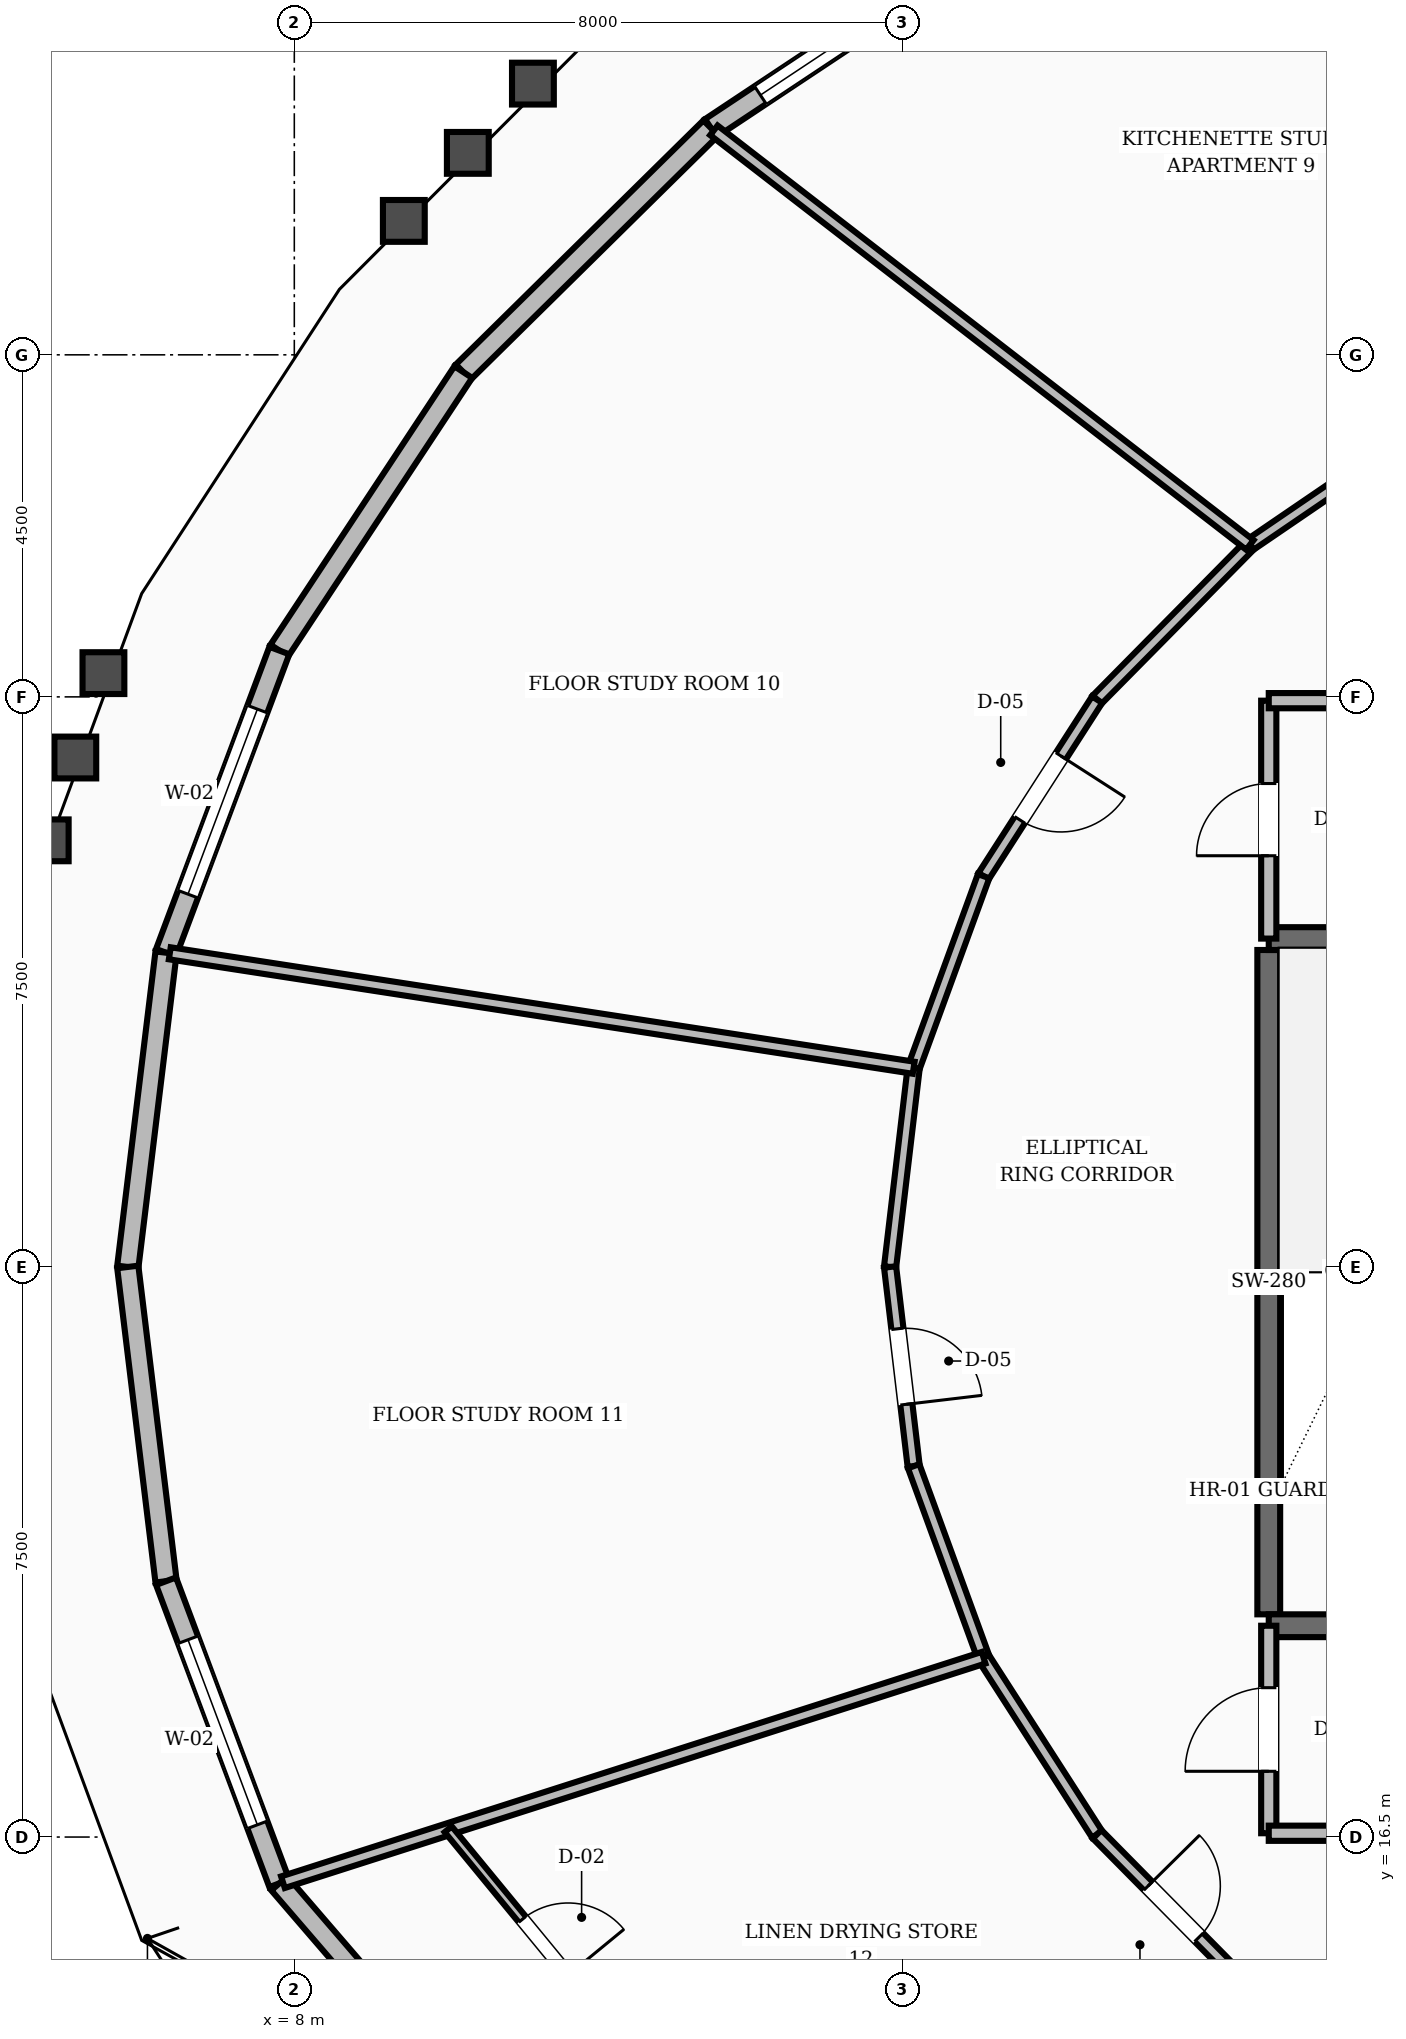
"""IFC4 building model, lengths in metres.
Left out: names, types, materials, properties, quantities, classifications, styles, units other than length and angle.
Written with IfcOpenShell. Run it as: python <this file> out.ifc"""

import sys

from ifc_helpers import new_model, si_unit, direction, frame, frame_2d, origin, place, context, subcontext, project, spatial, rectangle, extrude, element, fill, save


model = new_model("IFC4")
c1 = context("Model", 3, precision=1e-05, world=origin(), true_north=direction((0.0, 1.0)))
c2 = subcontext(c1, "Body", "Model", "MODEL_VIEW")
j1 = project(units=[si_unit("LENGTHUNIT", "METRE"), si_unit("PLANEANGLEUNIT", "RADIAN")], contexts=[c1])
p1 = place(None, origin())
s1 = spatial("IfcSite", under=j1, at=p1, CompositionType="ELEMENT")
p2 = place(p1, origin())
s2 = spatial("IfcBuilding", under=s1, at=p2, CompositionType="ELEMENT")
p3 = place(p2, frame((0.0, 0.0, 44.8)))
s3 = spatial("IfcBuildingStorey", under=s2, at=p3, CompositionType="ELEMENT", Elevation=44.8)
p4 = place(p3, frame((20.82, 19.43, 0.0), z_axis=(0.0, 0.0, 1.0), x_axis=(0.0, 1.0, 0.0)))
e1 = element("IfcWall", 1, at=p4, inside=s3, PredefinedType="SHEAR", context=c2, shape_type="SweptSolid", body=[
    extrude(rectangle(XDim=8.74, YDim=0.3, at=frame_2d((4.37, 0.0))), origin(), (0.0, 0.0, 1.0), 3.6),
])
p5 = place(p3, frame((20.82, 19.28, 0.0), z_axis=(0.0, 0.0, 1.0), x_axis=(1.0, 0.0, 0.0)))
e2 = element("IfcWall", 2, at=p5, inside=s3, PredefinedType="SHEAR", context=c2, shape_type="SweptSolid", body=[
    extrude(rectangle(XDim=3.6, YDim=0.3, at=frame_2d((1.8, 0.0))), origin(), (0.0, 0.0, 1.0), 3.6),
])
p6 = place(p5, frame((1.3, 0.0, 0.0)))
e3 = element("IfcOpeningElement", 3, at=p6, cuts=e2, PredefinedType="OPENING", context=c2, shape_type="SweptSolid", body=[
    extrude(rectangle(XDim=1.1, YDim=2.1, at=frame_2d((0.55, 1.05))), frame((0.0, 0.16, 0.0), z_axis=(0.0, -1.0, 0.0), x_axis=(1.0, 0.0, 0.0)), (0.0, 0.0, 1.0), 0.32),
])
p7 = place(p3, frame((20.82, 28.32, 0.0), z_axis=(0.0, 0.0, 1.0), x_axis=(1.0, 0.0, 0.0)))
e4 = element("IfcWall", 4, at=p7, inside=s3, PredefinedType="SHEAR", context=c2, shape_type="SweptSolid", body=[
    extrude(rectangle(XDim=3.6, YDim=0.3, at=frame_2d((1.8, 0.0))), origin(), (0.0, 0.0, 1.0), 3.6),
])
p8 = place(p3, frame((17.449, 41.619, 0.0), z_axis=(0.0, 0.0, 1.0), x_axis=(-0.833089497156, -0.55313821937, 0.0)))
e5 = element("IfcWall", 5, at=p8, inside=s3, PredefinedType="STANDARD", context=c2, shape_type="SweptSolid", body=[
    extrude(rectangle(XDim=4.764, YDim=0.28, at=frame_2d((2.382, 0.0))), origin(), (0.0, 0.0, 1.0), 2.65),
])
p9 = place(p8, frame((0.782, 0.0, 0.8)))
e6 = element("IfcOpeningElement", 6, at=p9, cuts=e5, PredefinedType="OPENING", context=c2, shape_type="SweptSolid", body=[
    extrude(rectangle(XDim=3.2, YDim=1.65, at=frame_2d((1.6, 0.825))), frame((0.0, 0.15, 0.0), z_axis=(0.0, -1.0, 0.0), x_axis=(1.0, 0.0, 0.0)), (0.0, 0.0, 1.0), 0.3),
])
p10 = place(p3, frame((13.48, 38.984, 0.0), z_axis=(0.0, 0.0, 1.0), x_axis=(-0.712106444973, -0.702071514184, 0.0)))
e7 = element("IfcWall", 7, at=p10, inside=s3, PredefinedType="STANDARD", context=c2, shape_type="SweptSolid", body=[
    extrude(rectangle(XDim=4.574, YDim=0.28, at=frame_2d((2.287, 0.0))), origin(), (0.0, 0.0, 1.0), 2.65),
])
p11 = place(p3, frame((10.223, 35.773, 0.0), z_axis=(0.0, 0.0, 1.0), x_axis=(-0.551192292831, -0.834378245356, 0.0)))
e8 = element("IfcWall", 8, at=p11, inside=s3, PredefinedType="STANDARD", context=c2, shape_type="SweptSolid", body=[
    extrude(rectangle(XDim=4.391, YDim=0.28, at=frame_2d((2.195, 0.0))), origin(), (0.0, 0.0, 1.0), 2.65),
])
p12 = place(p3, frame((7.803, 32.109, 0.0), z_axis=(0.0, 0.0, 1.0), x_axis=(-0.351066723894, -0.936350444745, 0.0)))
e9 = element("IfcWall", 9, at=p12, inside=s3, PredefinedType="STANDARD", context=c2, shape_type="SweptSolid", body=[
    extrude(rectangle(XDim=4.246, YDim=0.28, at=frame_2d((2.123, 0.0))), origin(), (0.0, 0.0, 1.0), 2.65),
])
p13 = place(p12, frame((0.823, 0.0, 0.8)))
e10 = element("IfcOpeningElement", 10, at=p13, cuts=e9, PredefinedType="OPENING", context=c2, shape_type="SweptSolid", body=[
    extrude(rectangle(XDim=2.6, YDim=1.65, at=frame_2d((1.3, 0.825))), frame((0.0, 0.15, 0.0), z_axis=(0.0, -1.0, 0.0), x_axis=(1.0, 0.0, 0.0)), (0.0, 0.0, 1.0), 0.3),
])
for number, where, z_axis, x_axis in (
    (11, (6.312, 28.134, 0.0), (0.0, 0.0, 1.0), (-0.121, -0.993, 0.0)),
    (12, (5.809, 24.0, 0.0), (0.0, 0.0, 1.0), (0.121, -0.993, 0.0)),
):
    element("IfcWall", number, at=place(p3, frame(where, z_axis=z_axis, x_axis=x_axis)), inside=s3, PredefinedType="STANDARD", context=c2, shape_type="SweptSolid", body=[
        extrude(rectangle(XDim=4.165, YDim=0.28, at=frame_2d((2.082, 0.0))), origin(), (0.0, 0.0, 1.0), 2.65),
    ])
p14 = place(p3, frame((6.312, 19.866, 0.0), z_axis=(0.0, 0.0, 1.0), x_axis=(0.351066723894, -0.936350444745, 0.0)))
e13 = element("IfcWall", 13, at=p14, inside=s3, PredefinedType="STANDARD", context=c2, shape_type="SweptSolid", body=[
    extrude(rectangle(XDim=4.246, YDim=0.28, at=frame_2d((2.123, 0.0))), origin(), (0.0, 0.0, 1.0), 2.65),
])
p15 = place(p14, frame((0.823, 0.0, 0.8)))
e14 = element("IfcOpeningElement", 14, at=p15, cuts=e13, PredefinedType="OPENING", context=c2, shape_type="SweptSolid", body=[
    extrude(rectangle(XDim=2.6, YDim=1.65, at=frame_2d((1.3, 0.825))), frame((0.0, 0.15, 0.0), z_axis=(0.0, -1.0, 0.0), x_axis=(1.0, 0.0, 0.0)), (0.0, 0.0, 1.0), 0.3),
])
p16 = place(p3, frame((7.803, 15.891, 0.0), z_axis=(0.0, 0.0, 1.0), x_axis=(0.652392900896, -0.757880929211, 0.0)))
e15 = element("IfcWall", 15, at=p16, inside=s3, PredefinedType="STANDARD", context=c2, shape_type="SweptSolid", body=[
    extrude(rectangle(XDim=4.515, YDim=0.28, at=frame_2d((2.258, 0.0))), origin(), (0.0, 0.0, 1.0), 2.65),
])
p17 = place(p3, frame((20.82, 16.55, 0.0), z_axis=(0.0, 0.0, 1.0), x_axis=(0.0, 1.0, 0.0)))
e16 = element("IfcWall", 16, at=p17, inside=s3, PredefinedType="SOLIDWALL", context=c2, shape_type="SweptSolid", body=[
    extrude(rectangle(XDim=2.73, YDim=0.2, at=frame_2d((1.365, 0.0))), origin(), (0.0, 0.0, 1.0), 2.61),
])
p18 = place(p17, frame((0.815, 0.0, 0.0)))
e17 = element("IfcOpeningElement", 17, at=p18, cuts=e16, PredefinedType="OPENING", context=c2, shape_type="SweptSolid", body=[
    extrude(rectangle(XDim=1.1, YDim=2.1, at=frame_2d((0.55, 1.05))), frame((0.0, 0.11, 0.0), z_axis=(0.0, -1.0, 0.0), x_axis=(1.0, 0.0, 0.0)), (0.0, 0.0, 1.0), 0.22),
])
p19 = place(p3, frame((20.82, 16.55, 0.0), z_axis=(0.0, 0.0, 1.0), x_axis=(1.0, 0.0, 0.0)))
e18 = element("IfcWall", 18, at=p19, inside=s3, PredefinedType="SOLIDWALL", context=c2, shape_type="SweptSolid", body=[
    extrude(rectangle(XDim=3.98, YDim=0.2, at=frame_2d((1.99, 0.0))), origin(), (0.0, 0.0, 1.0), 2.61),
])
p20 = place(p3, frame((20.82, 28.32, 0.0), z_axis=(0.0, 0.0, 1.0), x_axis=(0.0, 1.0, 0.0)))
e19 = element("IfcWall", 19, at=p20, inside=s3, PredefinedType="SOLIDWALL", context=c2, shape_type="SweptSolid", body=[
    extrude(rectangle(XDim=3.13, YDim=0.2, at=frame_2d((1.565, 0.0))), origin(), (0.0, 0.0, 1.0), 2.61),
])
p21 = place(p20, frame((1.09, 0.0, 0.0)))
e20 = element("IfcOpeningElement", 20, at=p21, cuts=e19, PredefinedType="OPENING", context=c2, shape_type="SweptSolid", body=[
    extrude(rectangle(XDim=0.95, YDim=2.1, at=frame_2d((0.475, 1.05))), frame((0.0, 0.11, 0.0), z_axis=(0.0, -1.0, 0.0), x_axis=(1.0, 0.0, 0.0)), (0.0, 0.0, 1.0), 0.22),
])
p22 = place(p3, frame((20.82, 31.45, 0.0), z_axis=(0.0, 0.0, 1.0), x_axis=(1.0, 0.0, 0.0)))
e21 = element("IfcWall", 21, at=p22, inside=s3, PredefinedType="SOLIDWALL", context=c2, shape_type="SweptSolid", body=[
    extrude(rectangle(XDim=3.98, YDim=0.2, at=frame_2d((1.99, 0.0))), origin(), (0.0, 0.0, 1.0), 2.61),
])
p23 = place(p3, frame((23.021, 35.17, 0.0), z_axis=(0.0, 0.0, 1.0), x_axis=(-0.826112340767, -0.563505457323, 0.0)))
e22 = element("IfcWall", 22, at=p23, inside=s3, PredefinedType="SOLIDWALL", context=c2, shape_type="SweptSolid", body=[
    extrude(rectangle(XDim=2.965, YDim=0.16, at=frame_2d((1.482, 0.0))), origin(), (0.0, 0.0, 1.0), 2.61),
])
p24 = place(p3, frame((20.572, 33.499, 0.0), z_axis=(0.0, 0.0, 1.0), x_axis=(-0.702569520063, -0.711615113301, 0.0)))
e23 = element("IfcWall", 23, at=p24, inside=s3, PredefinedType="SOLIDWALL", context=c2, shape_type="SweptSolid", body=[
    extrude(rectangle(XDim=2.861, YDim=0.16, at=frame_2d((1.43, 0.0))), origin(), (0.0, 0.0, 1.0), 2.61),
])
p25 = place(p3, frame((18.562, 31.463, 0.0), z_axis=(0.0, 0.0, 1.0), x_axis=(-0.540891657444, -0.841092274907, 0.0)))
e24 = element("IfcWall", 24, at=p25, inside=s3, PredefinedType="SOLIDWALL", context=c2, shape_type="SweptSolid", body=[
    extrude(rectangle(XDim=2.761, YDim=0.16, at=frame_2d((1.38, 0.0))), origin(), (0.0, 0.0, 1.0), 2.61),
])
p26 = place(p25, frame((0.881, 0.0, 0.0)))
e25 = element("IfcOpeningElement", 25, at=p26, cuts=e24, PredefinedType="OPENING", context=c2, shape_type="SweptSolid", body=[
    extrude(rectangle(XDim=1.0, YDim=2.1, at=frame_2d((0.5, 1.05))), frame((0.0, 0.09, 0.0), z_axis=(0.0, -1.0, 0.0), x_axis=(1.0, 0.0, 0.0)), (0.0, 0.0, 1.0), 0.18),
])
p27 = place(p3, frame((17.068, 29.141, 0.0), z_axis=(0.0, 0.0, 1.0), x_axis=(-0.342882618672, -0.939378257047, 0.0)))
e26 = element("IfcWall", 26, at=p27, inside=s3, PredefinedType="SOLIDWALL", context=c2, shape_type="SweptSolid", body=[
    extrude(rectangle(XDim=2.683, YDim=0.16, at=frame_2d((1.341, 0.0))), origin(), (0.0, 0.0, 1.0), 2.61),
])
p28 = place(p3, frame((16.148, 26.621, 0.0), z_axis=(0.0, 0.0, 1.0), x_axis=(-0.117667763342, -0.993053018459, 0.0)))
e27 = element("IfcWall", 27, at=p28, inside=s3, PredefinedType="SOLIDWALL", context=c2, shape_type="SweptSolid", body=[
    extrude(rectangle(XDim=2.639, YDim=0.16, at=frame_2d((1.32, 0.0))), origin(), (0.0, 0.0, 1.0), 2.61),
])
p29 = place(p3, frame((15.838, 24.0, 0.0), z_axis=(0.0, 0.0, 1.0), x_axis=(0.117667763342, -0.993053018459, 0.0)))
e28 = element("IfcWall", 28, at=p29, inside=s3, PredefinedType="SOLIDWALL", context=c2, shape_type="SweptSolid", body=[
    extrude(rectangle(XDim=2.639, YDim=0.16, at=frame_2d((1.32, 0.0))), origin(), (0.0, 0.0, 1.0), 2.61),
])
p30 = place(p29, frame((0.82, 0.0, 0.0)))
e29 = element("IfcOpeningElement", 29, at=p30, cuts=e28, PredefinedType="OPENING", context=c2, shape_type="SweptSolid", body=[
    extrude(rectangle(XDim=1.0, YDim=2.1, at=frame_2d((0.5, 1.05))), frame((0.0, 0.09, 0.0), z_axis=(0.0, -1.0, 0.0), x_axis=(1.0, 0.0, 0.0)), (0.0, 0.0, 1.0), 0.18),
])
p31 = place(p3, frame((16.148, 21.379, 0.0), z_axis=(0.0, 0.0, 1.0), x_axis=(0.342882618672, -0.939378257047, 0.0)))
e30 = element("IfcWall", 30, at=p31, inside=s3, PredefinedType="SOLIDWALL", context=c2, shape_type="SweptSolid", body=[
    extrude(rectangle(XDim=2.683, YDim=0.16, at=frame_2d((1.341, 0.0))), origin(), (0.0, 0.0, 1.0), 2.61),
])
p32 = place(p3, frame((17.068, 18.859, 0.0), z_axis=(0.0, 0.0, 1.0), x_axis=(0.540891657444, -0.841092274907, 0.0)))
e31 = element("IfcWall", 31, at=p32, inside=s3, PredefinedType="SOLIDWALL", context=c2, shape_type="SweptSolid", body=[
    extrude(rectangle(XDim=2.761, YDim=0.16, at=frame_2d((1.38, 0.0))), origin(), (0.0, 0.0, 1.0), 2.61),
])
p33 = place(p3, frame((18.562, 16.537, 0.0), z_axis=(0.0, 0.0, 1.0), x_axis=(0.702569520063, -0.711615113301, 0.0)))
e32 = element("IfcWall", 32, at=p33, inside=s3, PredefinedType="SOLIDWALL", context=c2, shape_type="SweptSolid", body=[
    extrude(rectangle(XDim=2.861, YDim=0.16, at=frame_2d((1.43, 0.0))), origin(), (0.0, 0.0, 1.0), 2.61),
])
p34 = place(p33, frame((0.955, 0.0, 0.0)))
e33 = element("IfcOpeningElement", 33, at=p34, cuts=e32, PredefinedType="OPENING", context=c2, shape_type="SweptSolid", body=[
    extrude(rectangle(XDim=0.95, YDim=2.1, at=frame_2d((0.475, 1.05))), frame((0.0, 0.09, 0.0), z_axis=(0.0, -1.0, 0.0), x_axis=(1.0, 0.0, 0.0)), (0.0, 0.0, 1.0), 0.18),
])
p35 = place(p3, frame((20.572, 33.499, 0.0), z_axis=(0.0, 0.0, 1.0), x_axis=(-0.790999441118, 0.611816871417, 0.0)))
e34 = element("IfcWall", 34, at=p35, inside=s3, PredefinedType="SOLIDWALL", context=c2, shape_type="SweptSolid", body=[
    extrude(rectangle(XDim=8.915, YDim=0.16, at=frame_2d((4.458, 0.0))), origin(), (0.0, 0.0, 1.0), 2.61),
])
p36 = place(p3, frame((16.148, 26.621, 0.0), z_axis=(0.0, 0.0, 1.0), x_axis=(-0.988371982693, 0.152055331469, 0.0)))
e35 = element("IfcWall", 35, at=p36, inside=s3, PredefinedType="SOLIDWALL", context=c2, shape_type="SweptSolid", body=[
    extrude(rectangle(XDim=9.902, YDim=0.16, at=frame_2d((4.951, 0.0))), origin(), (0.0, 0.0, 1.0), 2.61),
])
p37 = place(p3, frame((17.068, 18.859, 0.0), z_axis=(0.0, 0.0, 1.0), x_axis=(-0.952328332438, -0.30507498625, 0.0)))
e36 = element("IfcWall", 36, at=p37, inside=s3, PredefinedType="SOLIDWALL", context=c2, shape_type="SweptSolid", body=[
    extrude(rectangle(XDim=9.679, YDim=0.16, at=frame_2d((4.84, 0.0))), origin(), (0.0, 0.0, 1.0), 2.61),
])
p38 = place(p3, frame((10.025, 16.602, 0.0), z_axis=(0.0, 0.0, 1.0), x_axis=(0.634900022164, -0.772594306125, 0.0)))
e37 = element("IfcWall", 37, at=p38, inside=s3, PredefinedType="PARTITIONING", context=c2, shape_type="SweptSolid", body=[
    extrude(rectangle(XDim=4.02, YDim=0.12, at=frame_2d((2.01, 0.0))), origin(), (0.0, 0.0, 1.0), 2.61),
])
p39 = place(p38, frame((1.535, 0.0, 0.0)))
e38 = element("IfcOpeningElement", 38, at=p39, cuts=e37, PredefinedType="OPENING", context=c2, shape_type="SweptSolid", body=[
    extrude(rectangle(XDim=0.95, YDim=2.1, at=frame_2d((0.475, 1.05))), frame((0.0, 0.07, 0.0), z_axis=(0.0, -1.0, 0.0), x_axis=(1.0, 0.0, 0.0)), (0.0, 0.0, 1.0), 0.14),
])
p40 = place(p9, origin())
e39 = element("IfcWindow", 39, at=p40, inside=s3, PartitioningType="SINGLE_PANEL", PredefinedType="WINDOW", context=c2, shape_type="SweptSolid", body=[
    extrude(rectangle(XDim=3.2, YDim=1.65, at=frame_2d((1.6, 0.825))), frame((0.0, 0.03, 0.0), z_axis=(0.0, -1.0, 0.0), x_axis=(1.0, 0.0, 0.0)), (0.0, 0.0, 1.0), 0.06),
])
fill(e6, e39)
p41 = place(p13, origin())
e40 = element("IfcWindow", 40, at=p41, inside=s3, PartitioningType="SINGLE_PANEL", PredefinedType="WINDOW", context=c2, shape_type="SweptSolid", body=[
    extrude(rectangle(XDim=2.6, YDim=1.65, at=frame_2d((1.3, 0.825))), frame((0.0, 0.03, 0.0), z_axis=(0.0, -1.0, 0.0), x_axis=(1.0, 0.0, 0.0)), (0.0, 0.0, 1.0), 0.06),
])
fill(e10, e40)
p42 = place(p15, origin())
e41 = element("IfcWindow", 41, at=p42, inside=s3, PartitioningType="SINGLE_PANEL", PredefinedType="WINDOW", context=c2, shape_type="SweptSolid", body=[
    extrude(rectangle(XDim=2.6, YDim=1.65, at=frame_2d((1.3, 0.825))), frame((0.0, 0.03, 0.0), z_axis=(0.0, -1.0, 0.0), x_axis=(1.0, 0.0, 0.0)), (0.0, 0.0, 1.0), 0.06),
])
fill(e14, e41)
p43 = place(p18, origin())
e42 = element("IfcDoor", 42, at=p43, inside=s3, OperationType="SINGLE_SWING_LEFT", PredefinedType="DOOR", context=c2, shape_type="SweptSolid", body=[
    extrude(rectangle(XDim=1.1, YDim=2.1, at=frame_2d((0.55, 1.05))), frame((0.0, 0.025, 0.0), z_axis=(0.0, -1.0, 0.0), x_axis=(1.0, 0.0, 0.0)), (0.0, 0.0, 1.0), 0.05),
])
fill(e17, e42)
p44 = place(p21, origin())
e43 = element("IfcDoor", 43, at=p44, inside=s3, OperationType="SINGLE_SWING_LEFT", PredefinedType="DOOR", context=c2, shape_type="SweptSolid", body=[
    extrude(rectangle(XDim=0.95, YDim=2.1, at=frame_2d((0.475, 1.05))), frame((0.0, 0.025, 0.0), z_axis=(0.0, -1.0, 0.0), x_axis=(1.0, 0.0, 0.0)), (0.0, 0.0, 1.0), 0.05),
])
fill(e20, e43)
p45 = place(p26, origin())
e44 = element("IfcDoor", 44, at=p45, inside=s3, OperationType="SINGLE_SWING_LEFT", PredefinedType="DOOR", context=c2, shape_type="SweptSolid", body=[
    extrude(rectangle(XDim=1.0, YDim=2.1, at=frame_2d((0.5, 1.05))), frame((0.0, 0.025, 0.0), z_axis=(0.0, -1.0, 0.0), x_axis=(1.0, 0.0, 0.0)), (0.0, 0.0, 1.0), 0.05),
])
fill(e25, e44)
p46 = place(p30, origin())
e45 = element("IfcDoor", 45, at=p46, inside=s3, OperationType="SINGLE_SWING_RIGHT", PredefinedType="DOOR", context=c2, shape_type="SweptSolid", body=[
    extrude(rectangle(XDim=1.0, YDim=2.1, at=frame_2d((0.5, 1.05))), frame((0.0, 0.025, 0.0), z_axis=(0.0, -1.0, 0.0), x_axis=(1.0, 0.0, 0.0)), (0.0, 0.0, 1.0), 0.05),
])
fill(e29, e45)
p47 = place(p34, origin())
e46 = element("IfcDoor", 46, at=p47, inside=s3, OperationType="SINGLE_SWING_LEFT", PredefinedType="DOOR", context=c2, shape_type="SweptSolid", body=[
    extrude(rectangle(XDim=0.95, YDim=2.1, at=frame_2d((0.475, 1.05))), frame((0.0, 0.025, 0.0), z_axis=(0.0, -1.0, 0.0), x_axis=(1.0, 0.0, 0.0)), (0.0, 0.0, 1.0), 0.05),
])
fill(e33, e46)
p48 = place(p39, origin())
e47 = element("IfcDoor", 47, at=p48, inside=s3, OperationType="SINGLE_SWING_RIGHT", PredefinedType="DOOR", context=c2, shape_type="SweptSolid", body=[
    extrude(rectangle(XDim=0.95, YDim=2.1, at=frame_2d((0.475, 1.05))), frame((0.0, 0.025, 0.0), z_axis=(0.0, -1.0, 0.0), x_axis=(1.0, 0.0, 0.0)), (0.0, 0.0, 1.0), 0.05),
])
fill(e38, e47)
save(model, sys.argv[1])
